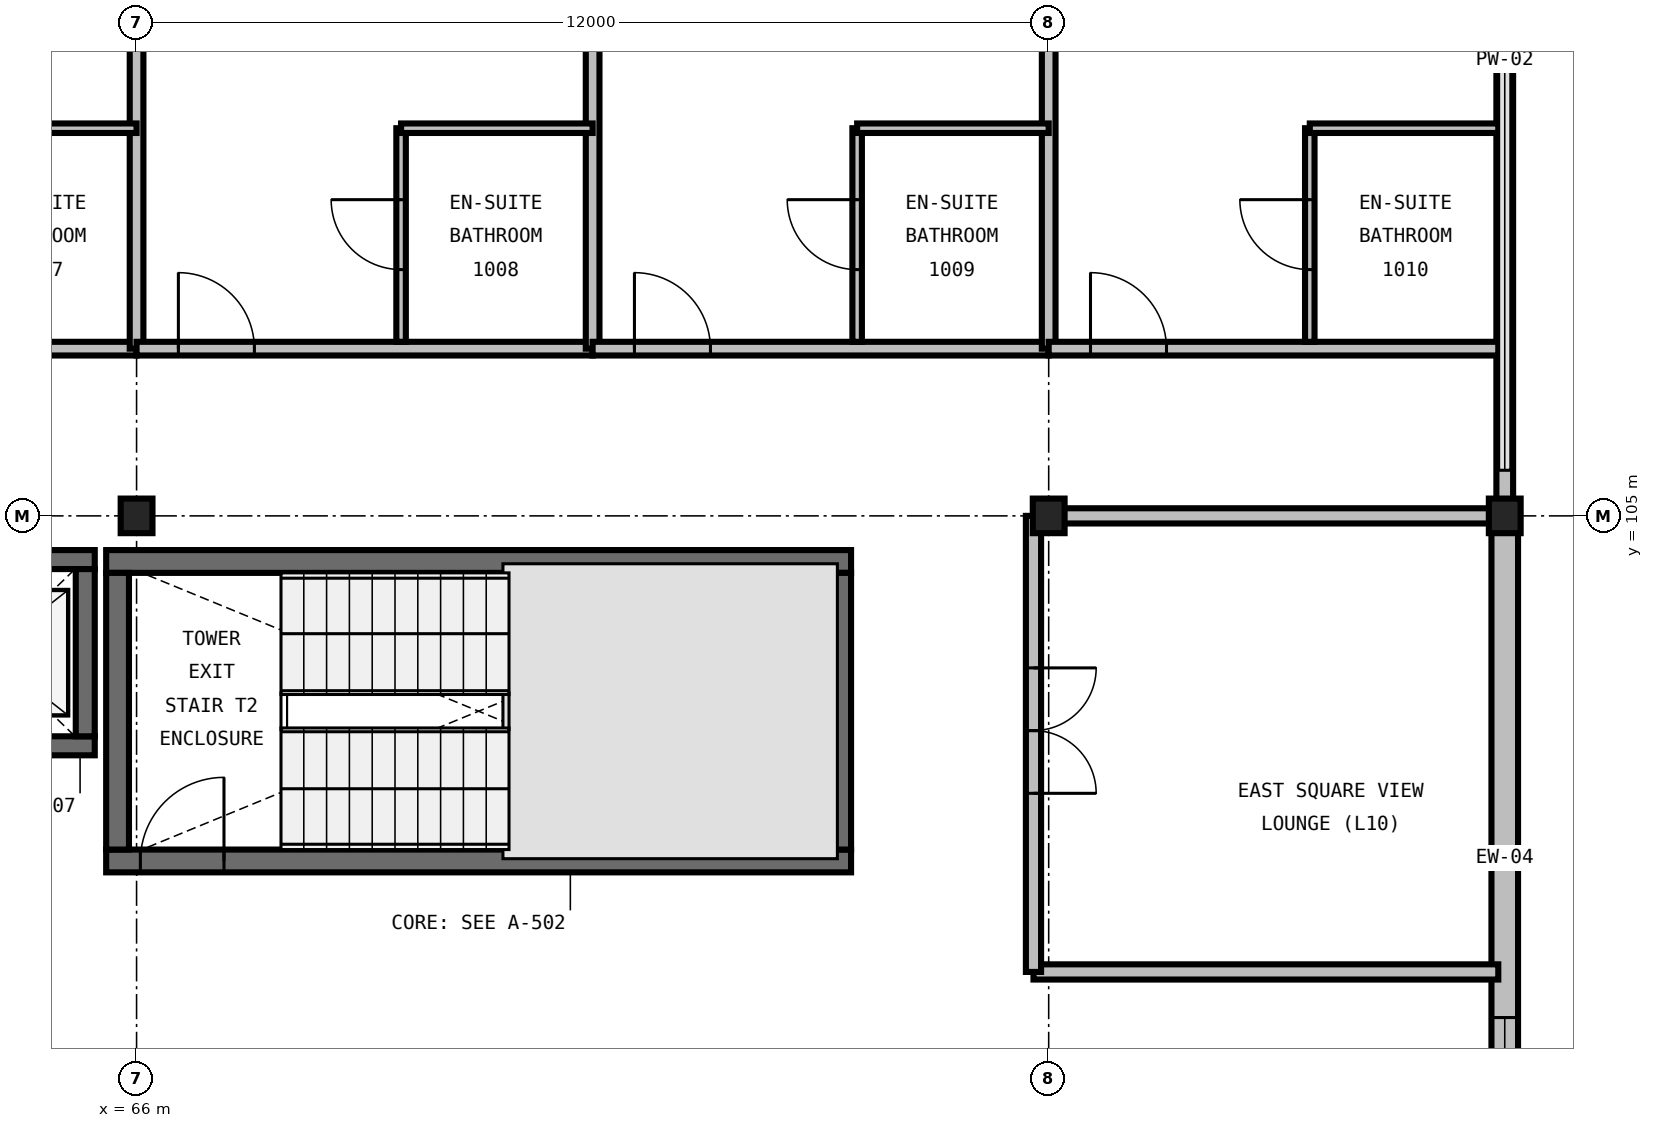
"""IFC4 building model, lengths in metres.
Left out: names, types, materials, properties, quantities, classifications, styles, units other than length and angle.
Written with IfcOpenShell. Run it as: python <this file> out.ifc"""

import sys

from ifc_helpers import new_model, si_unit, direction, frame, frame_2d, origin, origin_2d, place, context, subcontext, project, spatial, rectangle, i_section, extrude, element, fill, save


model = new_model("IFC4")
c1 = context("Model", 3, precision=1e-05, world=origin(), true_north=direction((0.0, 1.0)))
c2 = subcontext(c1, "Body", "Model", "MODEL_VIEW")
j1 = project(units=[si_unit("LENGTHUNIT", "METRE"), si_unit("PLANEANGLEUNIT", "RADIAN")], contexts=[c1])
p1 = place(None, origin())
s1 = spatial("IfcSite", under=j1, at=p1, CompositionType="ELEMENT")
p2 = place(p1, origin())
s2 = spatial("IfcBuilding", under=s1, at=p2, CompositionType="ELEMENT")
p3 = place(p2, frame((0.0, 0.0, 45.6)))
s3 = spatial("IfcBuildingStorey", under=s2, at=p3, CompositionType="ELEMENT", Elevation=45.6)
for number, where, z_axis, x_axis in (
    (1, (66.0, 105.0, 0.0), (0.0, 0.0, 1.0), (1.0, 0.0, 0.0)),
    (2, (78.0, 105.0, 0.0), (0.0, 0.0, 1.0), (1.0, 0.0, 0.0)),
    (3, (84.0, 105.0, 0.0), (0.0, 0.0, 1.0), (1.0, 0.0, 0.0)),
):
    element("IfcColumn", number, at=place(p3, frame(where, z_axis=z_axis, x_axis=x_axis)), inside=s3, PredefinedType="COLUMN", context=c2, shape_type="SweptSolid", body=[
        extrude(i_section(OverallWidth=0.419, OverallDepth=0.455, WebThickness=0.042, FlangeThickness=0.068, FilletRadius=0.031, at=origin_2d()), origin(), (0.0, 0.0, 1.0), 3.6),
    ])
p4 = place(p3, frame((65.6, 100.46, 0.0), z_axis=(0.0, 0.0, 1.0), x_axis=(1.0, 0.0, 0.0)))
e4 = element("IfcWall", 4, at=p4, inside=s3, PredefinedType="SHEAR", context=c2, shape_type="SweptSolid", body=[
    extrude(rectangle(XDim=9.8, YDim=0.3, at=frame_2d((4.9, 0.0))), origin(), (0.0, 0.0, 1.0), 3.6),
])
p5 = place(p4, frame((0.45, 0.0, 0.0)))
e5 = element("IfcOpeningElement", 5, at=p5, cuts=e4, PredefinedType="OPENING", context=c2, shape_type="SweptSolid", body=[
    extrude(rectangle(XDim=1.1, YDim=2.2, at=frame_2d((0.55, 1.1))), frame((0.0, 0.165, 0.0), z_axis=(0.0, -1.0, 0.0), x_axis=(1.0, 0.0, 0.0)), (0.0, 0.0, 1.0), 0.33),
])
p6 = place(p3, frame((75.4, 104.4, 0.0), z_axis=(0.0, 0.0, 1.0), x_axis=(-1.0, 0.0, 0.0)))
e6 = element("IfcWall", 6, at=p6, inside=s3, PredefinedType="SHEAR", context=c2, shape_type="SweptSolid", body=[
    extrude(rectangle(XDim=9.8, YDim=0.3, at=frame_2d((4.9, 0.0))), origin(), (0.0, 0.0, 1.0), 3.6),
])
for number, where, z_axis, x_axis in (
    (7, (65.75, 104.25, 0.0), (0.0, 0.0, 1.0), (0.0, -1.0, 0.0)),
    (8, (75.25, 100.61, 0.0), (0.0, 0.0, 1.0), (0.0, 1.0, 0.0)),
):
    element("IfcWall", number, at=place(p3, frame(where, z_axis=z_axis, x_axis=x_axis)), inside=s3, PredefinedType="SHEAR", context=c2, shape_type="SweptSolid", body=[
        extrude(rectangle(XDim=3.64, YDim=0.3, at=frame_2d((1.82, 0.0))), origin(), (0.0, 0.0, 1.0), 3.6),
    ])
p7 = place(p3, frame((62.65, 101.975, 0.0), z_axis=(0.0, 0.0, 1.0), x_axis=(1.0, 0.0, 0.0)))
e9 = element("IfcWall", 9, at=p7, inside=s3, PredefinedType="SHEAR", context=c2, shape_type="SweptSolid", body=[
    extrude(rectangle(XDim=2.8, YDim=0.25, at=frame_2d((1.4, 0.0))), origin(), (0.0, 0.0, 1.0), 3.6),
])
p8 = place(p7, frame((0.8, 0.0, 0.0)))
e10 = element("IfcOpeningElement", 10, at=p8, cuts=e9, PredefinedType="OPENING", context=c2, shape_type="SweptSolid", body=[
    extrude(rectangle(XDim=1.2, YDim=2.2, at=frame_2d((0.6, 1.1))), frame((0.0, 0.14, 0.0), z_axis=(0.0, -1.0, 0.0), x_axis=(1.0, 0.0, 0.0)), (0.0, 0.0, 1.0), 0.28),
])
p9 = place(p3, frame((65.45, 104.425, 0.0), z_axis=(0.0, 0.0, 1.0), x_axis=(-1.0, 0.0, 0.0)))
e11 = element("IfcWall", 11, at=p9, inside=s3, PredefinedType="SHEAR", context=c2, shape_type="SweptSolid", body=[
    extrude(rectangle(XDim=2.8, YDim=0.25, at=frame_2d((1.4, 0.0))), origin(), (0.0, 0.0, 1.0), 3.6),
])
p10 = place(p3, frame((65.325, 102.1, 0.0), z_axis=(0.0, 0.0, 1.0), x_axis=(0.0, 1.0, 0.0)))
e12 = element("IfcWall", 12, at=p10, inside=s3, PredefinedType="SHEAR", context=c2, shape_type="SweptSolid", body=[
    extrude(rectangle(XDim=2.2, YDim=0.25, at=frame_2d((1.1, 0.0))), origin(), (0.0, 0.0, 1.0), 3.6),
])
p11 = place(p3, frame((84.0, 96.0, 0.0), z_axis=(0.0, 0.0, 1.0), x_axis=(0.0, 1.0, 0.0)))
e13 = element("IfcWall", 13, at=p11, inside=s3, PredefinedType="STANDARD", context=c2, shape_type="SweptSolid", body=[
    extrude(rectangle(XDim=9.0, YDim=0.35, at=frame_2d((4.5, 0.0))), origin(), (0.0, 0.0, 1.0), 2.981),
])
p12 = place(p11, frame((0.6, 0.0, 0.85)))
e14 = element("IfcOpeningElement", 14, at=p12, cuts=e13, PredefinedType="OPENING", context=c2, shape_type="SweptSolid", body=[
    extrude(rectangle(XDim=1.8, YDim=1.5, at=frame_2d((0.9, 0.75))), frame((0.0, 0.19, 0.0), z_axis=(0.0, -1.0, 0.0), x_axis=(1.0, 0.0, 0.0)), (0.0, 0.0, 1.0), 0.38),
])
p13 = place(p3, frame((84.0, 105.0, 0.0), z_axis=(0.0, 0.0, 1.0), x_axis=(0.0, 1.0, 0.0)))
e15 = element("IfcWall", 15, at=p13, inside=s3, PredefinedType="PARAPET", context=c2, shape_type="SweptSolid", body=[
    extrude(rectangle(XDim=12.0, YDim=0.22, at=frame_2d((6.0, 0.0))), origin(), (0.0, 0.0, 1.0), 0.2),
])
p14 = place(p3, frame((60.0, 107.2, 0.0), z_axis=(0.0, 0.0, 1.0), x_axis=(1.0, 0.0, 0.0)))
e16 = element("IfcWall", 16, at=p14, inside=s3, PredefinedType="PARTITIONING", context=c2, shape_type="SweptSolid", body=[
    extrude(rectangle(XDim=6.0, YDim=0.18, at=frame_2d((3.0, 0.0))), origin(), (0.0, 0.0, 1.0), 3.29),
])
p15 = place(p14, frame((0.55, 0.0, 0.0)))
e17 = element("IfcOpeningElement", 17, at=p15, cuts=e16, PredefinedType="OPENING", context=c2, shape_type="SweptSolid", body=[
    extrude(rectangle(XDim=1.0, YDim=2.15, at=frame_2d((0.5, 1.075))), frame((0.0, 0.105, 0.0), z_axis=(0.0, -1.0, 0.0), x_axis=(1.0, 0.0, 0.0)), (0.0, 0.0, 1.0), 0.21),
])
p16 = place(p3, frame((66.0, 107.2, 0.0), z_axis=(0.0, 0.0, 1.0), x_axis=(0.0, 1.0, 0.0)))
e18 = element("IfcWall", 18, at=p16, inside=s3, PredefinedType="PARTITIONING", context=c2, shape_type="SweptSolid", body=[
    extrude(rectangle(XDim=9.625, YDim=0.18, at=frame_2d((4.812, 0.0))), origin(), (0.0, 0.0, 1.0), 2.59),
])
p17 = place(p3, frame((63.48, 110.1, 0.0), z_axis=(0.0, 0.0, 1.0), x_axis=(1.0, 0.0, 0.0)))
e19 = element("IfcWall", 19, at=p17, inside=s3, PredefinedType="PARTITIONING", context=c2, shape_type="SweptSolid", body=[
    extrude(rectangle(XDim=2.52, YDim=0.125, at=frame_2d((1.26, 0.0))), origin(), (0.0, 0.0, 1.0), 3.29),
])
p18 = place(p3, frame((66.0, 107.2, 0.0), z_axis=(0.0, 0.0, 1.0), x_axis=(1.0, 0.0, 0.0)))
e20 = element("IfcWall", 20, at=p18, inside=s3, PredefinedType="PARTITIONING", context=c2, shape_type="SweptSolid", body=[
    extrude(rectangle(XDim=6.0, YDim=0.18, at=frame_2d((3.0, 0.0))), origin(), (0.0, 0.0, 1.0), 3.29),
])
p19 = place(p18, frame((0.55, 0.0, 0.0)))
e21 = element("IfcOpeningElement", 21, at=p19, cuts=e20, PredefinedType="OPENING", context=c2, shape_type="SweptSolid", body=[
    extrude(rectangle(XDim=1.0, YDim=2.15, at=frame_2d((0.5, 1.075))), frame((0.0, 0.105, 0.0), z_axis=(0.0, -1.0, 0.0), x_axis=(1.0, 0.0, 0.0)), (0.0, 0.0, 1.0), 0.21),
])
p20 = place(p3, frame((72.0, 107.2, 0.0), z_axis=(0.0, 0.0, 1.0), x_axis=(0.0, 1.0, 0.0)))
e22 = element("IfcWall", 22, at=p20, inside=s3, PredefinedType="PARTITIONING", context=c2, shape_type="SweptSolid", body=[
    extrude(rectangle(XDim=9.625, YDim=0.18, at=frame_2d((4.812, 0.0))), origin(), (0.0, 0.0, 1.0), 3.29),
])
p21 = place(p3, frame((69.48, 107.29, 0.0), z_axis=(0.0, 0.0, 1.0), x_axis=(0.0, 1.0, 0.0)))
e23 = element("IfcWall", 23, at=p21, inside=s3, PredefinedType="PARTITIONING", context=c2, shape_type="SweptSolid", body=[
    extrude(rectangle(XDim=2.81, YDim=0.125, at=frame_2d((1.405, 0.0))), origin(), (0.0, 0.0, 1.0), 3.29),
])
p22 = place(p21, frame((0.95, 0.0, 0.0)))
e24 = element("IfcOpeningElement", 24, at=p22, cuts=e23, PredefinedType="OPENING", context=c2, shape_type="SweptSolid", body=[
    extrude(rectangle(XDim=0.92, YDim=2.1, at=frame_2d((0.46, 1.05))), frame((0.0, 0.077, 0.0), z_axis=(0.0, -1.0, 0.0), x_axis=(1.0, 0.0, 0.0)), (0.0, 0.0, 1.0), 0.155),
])
p23 = place(p3, frame((69.48, 110.1, 0.0), z_axis=(0.0, 0.0, 1.0), x_axis=(1.0, 0.0, 0.0)))
e25 = element("IfcWall", 25, at=p23, inside=s3, PredefinedType="PARTITIONING", context=c2, shape_type="SweptSolid", body=[
    extrude(rectangle(XDim=2.52, YDim=0.125, at=frame_2d((1.26, 0.0))), origin(), (0.0, 0.0, 1.0), 3.29),
])
p24 = place(p3, frame((72.0, 107.2, 0.0), z_axis=(0.0, 0.0, 1.0), x_axis=(1.0, 0.0, 0.0)))
e26 = element("IfcWall", 26, at=p24, inside=s3, PredefinedType="PARTITIONING", context=c2, shape_type="SweptSolid", body=[
    extrude(rectangle(XDim=6.0, YDim=0.18, at=frame_2d((3.0, 0.0))), origin(), (0.0, 0.0, 1.0), 3.29),
])
p25 = place(p24, frame((0.55, 0.0, 0.0)))
e27 = element("IfcOpeningElement", 27, at=p25, cuts=e26, PredefinedType="OPENING", context=c2, shape_type="SweptSolid", body=[
    extrude(rectangle(XDim=1.0, YDim=2.15, at=frame_2d((0.5, 1.075))), frame((0.0, 0.105, 0.0), z_axis=(0.0, -1.0, 0.0), x_axis=(1.0, 0.0, 0.0)), (0.0, 0.0, 1.0), 0.21),
])
p26 = place(p3, frame((78.0, 107.2, 0.0), z_axis=(0.0, 0.0, 1.0), x_axis=(0.0, 1.0, 0.0)))
e28 = element("IfcWall", 28, at=p26, inside=s3, PredefinedType="PARTITIONING", context=c2, shape_type="SweptSolid", body=[
    extrude(rectangle(XDim=9.625, YDim=0.18, at=frame_2d((4.812, 0.0))), origin(), (0.0, 0.0, 1.0), 2.59),
])
p27 = place(p3, frame((75.48, 107.29, 0.0), z_axis=(0.0, 0.0, 1.0), x_axis=(0.0, 1.0, 0.0)))
e29 = element("IfcWall", 29, at=p27, inside=s3, PredefinedType="PARTITIONING", context=c2, shape_type="SweptSolid", body=[
    extrude(rectangle(XDim=2.81, YDim=0.125, at=frame_2d((1.405, 0.0))), origin(), (0.0, 0.0, 1.0), 3.29),
])
p28 = place(p27, frame((0.95, 0.0, 0.0)))
e30 = element("IfcOpeningElement", 30, at=p28, cuts=e29, PredefinedType="OPENING", context=c2, shape_type="SweptSolid", body=[
    extrude(rectangle(XDim=0.92, YDim=2.1, at=frame_2d((0.46, 1.05))), frame((0.0, 0.077, 0.0), z_axis=(0.0, -1.0, 0.0), x_axis=(1.0, 0.0, 0.0)), (0.0, 0.0, 1.0), 0.155),
])
p29 = place(p3, frame((75.48, 110.1, 0.0), z_axis=(0.0, 0.0, 1.0), x_axis=(1.0, 0.0, 0.0)))
e31 = element("IfcWall", 31, at=p29, inside=s3, PredefinedType="PARTITIONING", context=c2, shape_type="SweptSolid", body=[
    extrude(rectangle(XDim=2.52, YDim=0.125, at=frame_2d((1.26, 0.0))), origin(), (0.0, 0.0, 1.0), 3.29),
])
p30 = place(p3, frame((78.0, 107.2, 0.0), z_axis=(0.0, 0.0, 1.0), x_axis=(1.0, 0.0, 0.0)))
e32 = element("IfcWall", 32, at=p30, inside=s3, PredefinedType="PARTITIONING", context=c2, shape_type="SweptSolid", body=[
    extrude(rectangle(XDim=5.915, YDim=0.18, at=frame_2d((2.957, 0.0))), origin(), (0.0, 0.0, 1.0), 3.29),
])
p31 = place(p30, frame((0.55, 0.0, 0.0)))
e33 = element("IfcOpeningElement", 33, at=p31, cuts=e32, PredefinedType="OPENING", context=c2, shape_type="SweptSolid", body=[
    extrude(rectangle(XDim=1.0, YDim=2.15, at=frame_2d((0.5, 1.075))), frame((0.0, 0.105, 0.0), z_axis=(0.0, -1.0, 0.0), x_axis=(1.0, 0.0, 0.0)), (0.0, 0.0, 1.0), 0.21),
])
p32 = place(p3, frame((81.435, 107.29, 0.0), z_axis=(0.0, 0.0, 1.0), x_axis=(0.0, 1.0, 0.0)))
e34 = element("IfcWall", 34, at=p32, inside=s3, PredefinedType="PARTITIONING", context=c2, shape_type="SweptSolid", body=[
    extrude(rectangle(XDim=2.81, YDim=0.125, at=frame_2d((1.405, 0.0))), origin(), (0.0, 0.0, 1.0), 3.29),
])
p33 = place(p32, frame((0.95, 0.0, 0.0)))
e35 = element("IfcOpeningElement", 35, at=p33, cuts=e34, PredefinedType="OPENING", context=c2, shape_type="SweptSolid", body=[
    extrude(rectangle(XDim=0.92, YDim=2.1, at=frame_2d((0.46, 1.05))), frame((0.0, 0.077, 0.0), z_axis=(0.0, -1.0, 0.0), x_axis=(1.0, 0.0, 0.0)), (0.0, 0.0, 1.0), 0.155),
])
p34 = place(p3, frame((81.435, 110.1, 0.0), z_axis=(0.0, 0.0, 1.0), x_axis=(1.0, 0.0, 0.0)))
e36 = element("IfcWall", 36, at=p34, inside=s3, PredefinedType="PARTITIONING", context=c2, shape_type="SweptSolid", body=[
    extrude(rectangle(XDim=2.48, YDim=0.125, at=frame_2d((1.24, 0.0))), origin(), (0.0, 0.0, 1.0), 3.29),
])
p35 = place(p3, frame((77.8, 99.0, 0.0), z_axis=(0.0, 0.0, 1.0), x_axis=(1.0, 0.0, 0.0)))
e37 = element("IfcWall", 37, at=p35, inside=s3, PredefinedType="PARTITIONING", context=c2, shape_type="SweptSolid", body=[
    extrude(rectangle(XDim=6.115, YDim=0.2, at=frame_2d((3.057, 0.0))), origin(), (0.0, 0.0, 1.0), 3.29),
])
p36 = place(p3, frame((83.915, 105.0, 0.0), z_axis=(0.0, 0.0, 1.0), x_axis=(-1.0, 0.0, 0.0)))
e38 = element("IfcWall", 38, at=p36, inside=s3, PredefinedType="PARTITIONING", context=c2, shape_type="SweptSolid", body=[
    extrude(rectangle(XDim=6.115, YDim=0.2, at=frame_2d((3.057, 0.0))), origin(), (0.0, 0.0, 1.0), 2.736),
])
p37 = place(p3, frame((77.8, 105.0, 0.0), z_axis=(0.0, 0.0, 1.0), x_axis=(0.0, -1.0, 0.0)))
e39 = element("IfcWall", 39, at=p37, inside=s3, PredefinedType="PARTITIONING", context=c2, shape_type="SweptSolid", body=[
    extrude(rectangle(XDim=6.0, YDim=0.2, at=frame_2d((3.0, 0.0))), origin(), (0.0, 0.0, 1.0), 3.29),
])
p38 = place(p37, frame((2.0, 0.0, 0.0)))
e40 = element("IfcOpeningElement", 40, at=p38, cuts=e39, PredefinedType="OPENING", context=c2, shape_type="SweptSolid", body=[
    extrude(rectangle(XDim=1.65, YDim=2.25, at=frame_2d((0.825, 1.125))), frame((0.0, 0.115, 0.0), z_axis=(0.0, -1.0, 0.0), x_axis=(1.0, 0.0, 0.0)), (0.0, 0.0, 1.0), 0.23),
])
p39 = place(p5, origin())
e41 = element("IfcDoor", 41, at=p39, inside=s3, OperationType="SINGLE_SWING_RIGHT", PredefinedType="DOOR", context=c2, shape_type="SweptSolid", body=[
    extrude(rectangle(XDim=1.1, YDim=2.2, at=frame_2d((0.55, 1.1))), frame((0.0, 0.025, 0.0), z_axis=(0.0, -1.0, 0.0), x_axis=(1.0, 0.0, 0.0)), (0.0, 0.0, 1.0), 0.05),
])
fill(e5, e41)
p40 = place(p12, origin())
e42 = element("IfcWindow", 42, at=p40, inside=s3, PartitioningType="SINGLE_PANEL", PredefinedType="WINDOW", context=c2, shape_type="SweptSolid", body=[
    extrude(rectangle(XDim=1.8, YDim=1.5, at=frame_2d((0.9, 0.75))), frame((0.0, 0.03, 0.0), z_axis=(0.0, -1.0, 0.0), x_axis=(1.0, 0.0, 0.0)), (0.0, 0.0, 1.0), 0.06),
])
fill(e14, e42)
p41 = place(p19, origin())
e43 = element("IfcDoor", 43, at=p41, inside=s3, OperationType="SINGLE_SWING_LEFT", PredefinedType="DOOR", context=c2, shape_type="SweptSolid", body=[
    extrude(rectangle(XDim=1.0, YDim=2.15, at=frame_2d((0.5, 1.075))), frame((0.0, 0.025, 0.0), z_axis=(0.0, -1.0, 0.0), x_axis=(1.0, 0.0, 0.0)), (0.0, 0.0, 1.0), 0.05),
])
fill(e21, e43)
p42 = place(p22, origin())
e44 = element("IfcDoor", 44, at=p42, inside=s3, OperationType="SINGLE_SWING_RIGHT", PredefinedType="DOOR", context=c2, shape_type="SweptSolid", body=[
    extrude(rectangle(XDim=0.92, YDim=2.1, at=frame_2d((0.46, 1.05))), frame((0.0, 0.025, 0.0), z_axis=(0.0, -1.0, 0.0), x_axis=(1.0, 0.0, 0.0)), (0.0, 0.0, 1.0), 0.05),
])
fill(e24, e44)
p43 = place(p25, origin())
e45 = element("IfcDoor", 45, at=p43, inside=s3, OperationType="SINGLE_SWING_LEFT", PredefinedType="DOOR", context=c2, shape_type="SweptSolid", body=[
    extrude(rectangle(XDim=1.0, YDim=2.15, at=frame_2d((0.5, 1.075))), frame((0.0, 0.025, 0.0), z_axis=(0.0, -1.0, 0.0), x_axis=(1.0, 0.0, 0.0)), (0.0, 0.0, 1.0), 0.05),
])
fill(e27, e45)
p44 = place(p28, origin())
e46 = element("IfcDoor", 46, at=p44, inside=s3, OperationType="SINGLE_SWING_RIGHT", PredefinedType="DOOR", context=c2, shape_type="SweptSolid", body=[
    extrude(rectangle(XDim=0.92, YDim=2.1, at=frame_2d((0.46, 1.05))), frame((0.0, 0.025, 0.0), z_axis=(0.0, -1.0, 0.0), x_axis=(1.0, 0.0, 0.0)), (0.0, 0.0, 1.0), 0.05),
])
fill(e30, e46)
p45 = place(p31, origin())
e47 = element("IfcDoor", 47, at=p45, inside=s3, OperationType="SINGLE_SWING_LEFT", PredefinedType="DOOR", context=c2, shape_type="SweptSolid", body=[
    extrude(rectangle(XDim=1.0, YDim=2.15, at=frame_2d((0.5, 1.075))), frame((0.0, 0.025, 0.0), z_axis=(0.0, -1.0, 0.0), x_axis=(1.0, 0.0, 0.0)), (0.0, 0.0, 1.0), 0.05),
])
fill(e33, e47)
p46 = place(p33, origin())
e48 = element("IfcDoor", 48, at=p46, inside=s3, OperationType="SINGLE_SWING_RIGHT", PredefinedType="DOOR", context=c2, shape_type="SweptSolid", body=[
    extrude(rectangle(XDim=0.92, YDim=2.1, at=frame_2d((0.46, 1.05))), frame((0.0, 0.025, 0.0), z_axis=(0.0, -1.0, 0.0), x_axis=(1.0, 0.0, 0.0)), (0.0, 0.0, 1.0), 0.05),
])
fill(e35, e48)
p47 = place(p38, origin())
e49 = element("IfcDoor", 49, at=p47, inside=s3, OperationType="DOUBLE_DOOR_SINGLE_SWING", PredefinedType="DOOR", context=c2, shape_type="SweptSolid", body=[
    extrude(rectangle(XDim=1.65, YDim=2.25, at=frame_2d((0.825, 1.125))), frame((0.0, 0.025, 0.0), z_axis=(0.0, -1.0, 0.0), x_axis=(1.0, 0.0, 0.0)), (0.0, 0.0, 1.0), 0.05),
])
fill(e40, e49)
save(model, sys.argv[1])
